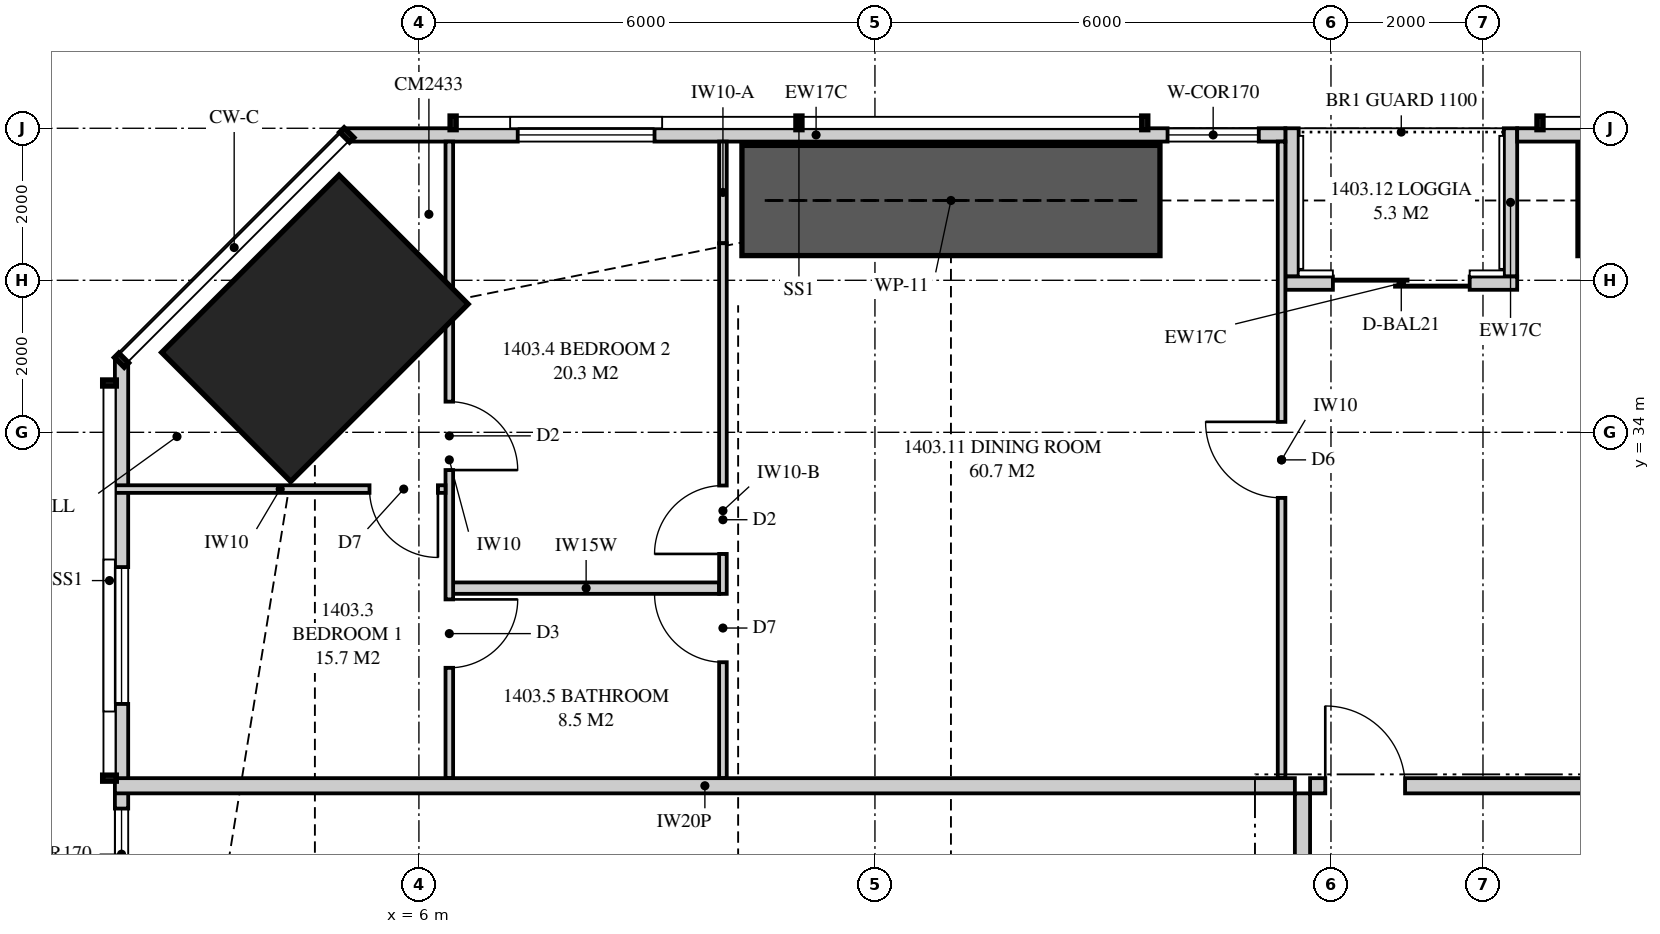
"""IFC4 building model, lengths in metres.
Left out: names, types, materials, properties, quantities, classifications, styles, units other than length and angle.
Written with IfcOpenShell. Run it as: python <this file> out.ifc"""

import sys

from ifc_helpers import new_model, si_unit, direction, frame, frame_2d, origin, origin_2d, place, context, subcontext, project, spatial, polyline, rectangle, outline, extrude, element, fill, save


model = new_model("IFC4")
c1 = context("Model", 3, precision=1e-05, world=origin(), true_north=direction((0.0, 1.0)))
c2 = subcontext(c1, "Body", "Model", "MODEL_VIEW")
j1 = project(units=[si_unit("LENGTHUNIT", "METRE"), si_unit("PLANEANGLEUNIT", "RADIAN")], contexts=[c1])
p1 = place(None, origin())
s1 = spatial("IfcSite", under=j1, at=p1, CompositionType="ELEMENT")
p2 = place(p1, origin())
s2 = spatial("IfcBuilding", under=s1, at=p2, CompositionType="ELEMENT")
p3 = place(p2, frame((0.0, 0.0, 54.5)))
s3 = spatial("IfcBuildingStorey", under=s2, at=p3, CompositionType="ELEMENT", Elevation=54.5)
p4 = place(p3, frame((4.631, 35.369, 0.0), z_axis=(0.0, 0.0, 1.0), x_axis=(0.707106781187, -0.707106781187, 0.0)))
e1 = element("IfcColumn", 1, at=p4, inside=s3, PredefinedType="COLUMN", context=c2, shape_type="SweptSolid", body=[
    extrude(rectangle(XDim=2.4, YDim=3.3, at=origin_2d()), origin(), (0.0, 0.0, 1.0), 3.35),
])
p5 = place(p3, frame((37.824, 37.913, 0.0), z_axis=(0.0, 0.0, 1.0), x_axis=(-1.0, 0.0, 0.0)))
e2 = element("IfcWall", 2, at=p5, inside=s3, PredefinedType="SOLIDWALL", context=c2, shape_type="SweptSolid", body=[
    extrude(outline(polyline([(0.0, 0.0), (17.374, 0.0), (17.374, 2.15), (2.824, 2.15), (2.824, 3.11), (2.668, 3.11), (2.668, 2.15), (2.62, 2.15), (2.62, 3.11), (0.0, 3.11), (0.0, 0.0)])), frame((0.0, 0.087, 0.0), z_axis=(0.0, -1.0, 0.0), x_axis=(1.0, 0.0, 0.0)), (0.0, 0.0, 1.0), 0.175),
])
p6 = place(p5, frame((5.699, 0.0, 0.4)))
e3 = element("IfcOpeningElement", 3, at=p6, cuts=e2, PredefinedType="OPENING", context=c2, shape_type="SweptSolid", body=[
    extrude(rectangle(XDim=1.8, YDim=1.7, at=frame_2d((0.9, 0.85))), frame((0.0, 0.097, 0.0), z_axis=(0.0, -1.0, 0.0), x_axis=(1.0, 0.0, 0.0)), (0.0, 0.0, 1.0), 0.195),
])
p7 = place(p5, frame((9.124, 0.0, 0.4)))
e4 = element("IfcOpeningElement", 4, at=p7, cuts=e2, PredefinedType="OPENING", context=c2, shape_type="SweptSolid", body=[
    extrude(rectangle(XDim=1.8, YDim=1.7, at=frame_2d((0.9, 0.85))), frame((0.0, 0.097, 0.0), z_axis=(0.0, -1.0, 0.0), x_axis=(1.0, 0.0, 0.0)), (0.0, 0.0, 1.0), 0.195),
])
p8 = place(p3, frame((17.4, 37.913, 0.0), z_axis=(0.0, 0.0, 1.0), x_axis=(-1.0, 0.0, 0.0)))
e5 = element("IfcWall", 5, at=p8, inside=s3, PredefinedType="SOLIDWALL", context=c2, shape_type="SweptSolid", body=[
    extrude(outline(polyline([(0.0, 0.0), (12.349, 0.0), (12.349, 3.11), (4.604, 3.11), (4.604, 2.15), (4.556, 2.15), (4.556, 3.11), (4.4, 3.11), (4.4, 2.15), (0.0, 2.15), (0.0, 0.0)])), frame((0.0, 0.087, 0.0), z_axis=(0.0, -1.0, 0.0), x_axis=(1.0, 0.0, 0.0)), (0.0, 0.0, 1.0), 0.175),
])
p9 = place(p8, frame((0.35, 0.0, 0.4)))
e6 = element("IfcOpeningElement", 6, at=p9, cuts=e5, PredefinedType="OPENING", context=c2, shape_type="SweptSolid", body=[
    extrude(rectangle(XDim=1.2, YDim=1.7, at=frame_2d((0.6, 0.85))), frame((0.0, 0.097, 0.0), z_axis=(0.0, -1.0, 0.0), x_axis=(1.0, 0.0, 0.0)), (0.0, 0.0, 1.0), 0.195),
])
p10 = place(p8, frame((8.3, 0.0, 0.4)))
e7 = element("IfcOpeningElement", 7, at=p10, cuts=e5, PredefinedType="OPENING", context=c2, shape_type="SweptSolid", body=[
    extrude(rectangle(XDim=1.8, YDim=1.7, at=frame_2d((0.9, 0.85))), frame((0.0, 0.097, 0.0), z_axis=(0.0, -1.0, 0.0), x_axis=(1.0, 0.0, 0.0)), (0.0, 0.0, 1.0), 0.195),
])
p11 = place(p3, frame((20.45, 35.962, 0.0), z_axis=(0.0, 0.0, 1.0), x_axis=(-1.0, 0.0, 0.0)))
e8 = element("IfcWall", 8, at=p11, inside=s3, PredefinedType="SOLIDWALL", context=c2, shape_type="SweptSolid", body=[
    extrude(rectangle(XDim=3.05, YDim=0.175, at=frame_2d((1.525, 0.0))), origin(), (0.0, 0.0, 1.0), 3.11),
])
p12 = place(p11, frame((0.625, 0.0, 0.0)))
e9 = element("IfcOpeningElement", 9, at=p12, cuts=e8, PredefinedType="OPENING", context=c2, shape_type="SweptSolid", body=[
    extrude(rectangle(XDim=1.8, YDim=2.1, at=frame_2d((0.9, 1.05))), frame((0.0, 0.097, 0.0), z_axis=(0.0, -1.0, 0.0), x_axis=(1.0, 0.0, 0.0)), (0.0, 0.0, 1.0), 0.195),
])
for number, where, z_axis, x_axis in (
    (10, (20.363, 38.0, 0.0), (0.0, 0.0, 1.0), (0.0, -1.0, 0.0)),
    (11, (17.488, 38.0, 0.0), (0.0, 0.0, 1.0), (0.0, -1.0, 0.0)),
):
    element("IfcWall", number, at=place(p3, frame(where, z_axis=z_axis, x_axis=x_axis)), inside=s3, PredefinedType="SOLIDWALL", context=c2, shape_type="SweptSolid", body=[
        extrude(outline(polyline([(0.0, 0.0), (1.95, 0.0), (1.95, 3.11), (1.75, 3.11), (1.75, 2.15), (0.15, 2.15), (0.15, 3.11), (0.0, 3.11), (0.0, 0.0)])), frame((0.0, 0.087, 0.0), z_axis=(0.0, -1.0, 0.0), x_axis=(1.0, 0.0, 0.0)), (0.0, 0.0, 1.0), 0.175),
    ])
p13 = place(p3, frame((2.087, 34.949, 0.0), z_axis=(0.0, 0.0, 1.0), x_axis=(0.0, -1.0, 0.0)))
e12 = element("IfcWall", 12, at=p13, inside=s3, PredefinedType="SOLIDWALL", context=c2, shape_type="SweptSolid", body=[
    extrude(outline(polyline([(0.0, 0.0), (15.599, 0.0), (15.599, 2.15), (9.949, 2.15), (9.949, 3.11), (9.823, 3.11), (9.823, 2.15), (9.73, 2.15), (9.73, 3.11), (0.0, 3.11), (0.0, 0.0)])), frame((0.0, 0.087, 0.0), z_axis=(0.0, -1.0, 0.0), x_axis=(1.0, 0.0, 0.0)), (0.0, 0.0, 1.0), 0.175),
])
p14 = place(p13, frame((2.722, 0.0, 0.4)))
e13 = element("IfcOpeningElement", 13, at=p14, cuts=e12, PredefinedType="OPENING", context=c2, shape_type="SweptSolid", body=[
    extrude(rectangle(XDim=1.8, YDim=1.7, at=frame_2d((0.9, 0.85))), frame((0.0, 0.097, 0.0), z_axis=(0.0, -1.0, 0.0), x_axis=(1.0, 0.0, 0.0)), (0.0, 0.0, 1.0), 0.195),
])
p15 = place(p13, frame((5.899, 0.0, 0.4)))
e14 = element("IfcOpeningElement", 14, at=p15, cuts=e12, PredefinedType="OPENING", context=c2, shape_type="SweptSolid", body=[
    extrude(rectangle(XDim=1.2, YDim=1.7, at=frame_2d((0.6, 0.85))), frame((0.0, 0.097, 0.0), z_axis=(0.0, -1.0, 0.0), x_axis=(1.0, 0.0, 0.0)), (0.0, 0.0, 1.0), 0.195),
])
p16 = place(p13, frame((12.824, 0.0, 0.4)))
e15 = element("IfcOpeningElement", 15, at=p16, cuts=e12, PredefinedType="OPENING", context=c2, shape_type="SweptSolid", body=[
    extrude(rectangle(XDim=1.8, YDim=1.7, at=frame_2d((0.9, 0.85))), frame((0.0, 0.097, 0.0), z_axis=(0.0, -1.0, 0.0), x_axis=(1.0, 0.0, 0.0)), (0.0, 0.0, 1.0), 0.195),
])
p17 = place(p3, frame((17.725, 29.35, 0.0), z_axis=(0.0, 0.0, 1.0), x_axis=(1.0, 0.0, 0.0)))
e16 = element("IfcWall", 16, at=p17, inside=s3, PredefinedType="PARTITIONING", context=c2, shape_type="SweptSolid", body=[
    extrude(outline(polyline([(0.0, 0.0), (15.275, 0.0), (15.275, 3.11), (6.612, 3.11), (6.612, 2.541), (5.938, 2.541), (5.938, 3.11), (0.0, 3.11), (0.0, 0.0)])), frame((0.0, 0.1, 0.0), z_axis=(0.0, -1.0, 0.0), x_axis=(1.0, 0.0, 0.0)), (0.0, 0.0, 1.0), 0.2),
])
p18 = place(p17, frame((0.2, 0.0, 0.0)))
e17 = element("IfcOpeningElement", 17, at=p18, cuts=e16, PredefinedType="OPENING", context=c2, shape_type="SweptSolid", body=[
    extrude(rectangle(XDim=1.05, YDim=2.2, at=frame_2d((0.525, 1.1))), frame((0.0, 0.11, 0.0), z_axis=(0.0, -1.0, 0.0), x_axis=(1.0, 0.0, 0.0)), (0.0, 0.0, 1.0), 0.22),
])
p19 = place(p3, frame((6.4, 37.825, 0.0), z_axis=(0.0, 0.0, 1.0), x_axis=(0.0, -1.0, 0.0)))
e18 = element("IfcWall", 18, at=p19, inside=s3, PredefinedType="PARTITIONING", context=c2, shape_type="SweptSolid", body=[
    extrude(outline(polyline([(0.0, 0.0), (8.375, 0.0), (8.375, 3.11), (2.978, 3.11), (2.978, 2.15), (1.224, 2.15), (1.224, 3.11), (0.0, 3.11), (0.0, 0.0)])), frame((0.0, 0.05, 0.0), z_axis=(0.0, -1.0, 0.0), x_axis=(1.0, 0.0, 0.0)), (0.0, 0.0, 1.0), 0.1),
])
p20 = place(p19, frame((3.422, 0.0, 0.0)))
e19 = element("IfcOpeningElement", 19, at=p20, cuts=e18, PredefinedType="OPENING", context=c2, shape_type="SweptSolid", body=[
    extrude(rectangle(XDim=0.9, YDim=2.1, at=frame_2d((0.45, 1.05))), frame((0.0, 0.06, 0.0), z_axis=(0.0, -1.0, 0.0), x_axis=(1.0, 0.0, 0.0)), (0.0, 0.0, 1.0), 0.12),
])
p21 = place(p19, frame((6.023, 0.0, 0.0)))
e20 = element("IfcOpeningElement", 20, at=p21, cuts=e18, PredefinedType="OPENING", context=c2, shape_type="SweptSolid", body=[
    extrude(rectangle(XDim=0.9, YDim=2.1, at=frame_2d((0.45, 1.05))), frame((0.0, 0.06, 0.0), z_axis=(0.0, -1.0, 0.0), x_axis=(1.0, 0.0, 0.0)), (0.0, 0.0, 1.0), 0.12),
])
p22 = place(p3, frame((10.0, 37.825, 0.0), z_axis=(0.0, 0.0, 1.0), x_axis=(0.0, -1.0, 0.0)))
e21 = element("IfcWall", 21, at=p22, inside=s3, PredefinedType="PARTITIONING", context=c2, shape_type="SweptSolid", body=[
    extrude(outline(polyline([(0.0, 0.0), (1.338, 0.0), (1.338, 2.15), (0.5, 2.15), (0.5, 3.11), (0.0, 3.11), (0.0, 0.0)])), frame((0.0, 0.05, 0.0), z_axis=(0.0, -1.0, 0.0), x_axis=(1.0, 0.0, 0.0)), (0.0, 0.0, 1.0), 0.1),
])
p23 = place(p3, frame((10.0, 36.487, 0.0), z_axis=(0.0, 0.0, 1.0), x_axis=(0.0, -1.0, 0.0)))
e22 = element("IfcWall", 22, at=p23, inside=s3, PredefinedType="PARTITIONING", context=c2, shape_type="SweptSolid", body=[
    extrude(outline(polyline([(0.0, 0.0), (7.037, 0.0), (7.037, 2.51), (0.917, 2.51), (0.917, 2.15), (0.0, 2.15), (0.0, 0.0)])), frame((0.0, 0.05, 0.0), z_axis=(0.0, -1.0, 0.0), x_axis=(1.0, 0.0, 0.0)), (0.0, 0.0, 1.0), 0.1),
])
p24 = place(p23, frame((3.188, 0.0, 0.0)))
e23 = element("IfcOpeningElement", 23, at=p24, cuts=e22, PredefinedType="OPENING", context=c2, shape_type="SweptSolid", body=[
    extrude(rectangle(XDim=0.9, YDim=2.1, at=frame_2d((0.45, 1.05))), frame((0.0, 0.06, 0.0), z_axis=(0.0, -1.0, 0.0), x_axis=(1.0, 0.0, 0.0)), (0.0, 0.0, 1.0), 0.12),
])
p25 = place(p23, frame((4.612, 0.0, 0.0)))
e24 = element("IfcOpeningElement", 24, at=p25, cuts=e22, PredefinedType="OPENING", context=c2, shape_type="SweptSolid", body=[
    extrude(rectangle(XDim=0.9, YDim=2.1, at=frame_2d((0.45, 1.05))), frame((0.0, 0.06, 0.0), z_axis=(0.0, -1.0, 0.0), x_axis=(1.0, 0.0, 0.0)), (0.0, 0.0, 1.0), 0.12),
])
p26 = place(p3, frame((2.0, 33.253, 0.0), z_axis=(0.0, 0.0, 1.0), x_axis=(1.0, 0.0, 0.0)))
e25 = element("IfcWall", 25, at=p26, inside=s3, PredefinedType="PARTITIONING", context=c2, shape_type="SweptSolid", body=[
    extrude(outline(polyline([(0.0, 0.0), (4.35, 0.0), (4.35, 3.11), (3.16, 3.11), (3.16, 2.15), (1.417, 2.15), (1.417, 3.11), (0.0, 3.11), (0.0, 0.0)])), frame((0.0, 0.05, 0.0), z_axis=(0.0, -1.0, 0.0), x_axis=(1.0, 0.0, 0.0)), (0.0, 0.0, 1.0), 0.1),
])
p27 = place(p26, frame((3.35, 0.0, 0.0)))
e26 = element("IfcOpeningElement", 26, at=p27, cuts=e25, PredefinedType="OPENING", context=c2, shape_type="SweptSolid", body=[
    extrude(rectangle(XDim=0.9, YDim=2.1, at=frame_2d((0.45, 1.05))), frame((0.0, 0.06, 0.0), z_axis=(0.0, -1.0, 0.0), x_axis=(1.0, 0.0, 0.0)), (0.0, 0.0, 1.0), 0.12),
])
p28 = place(p3, frame((6.45, 31.95, 0.0), z_axis=(0.0, 0.0, 1.0), x_axis=(1.0, 0.0, 0.0)))
e27 = element("IfcWall", 27, at=p28, inside=s3, PredefinedType="PLUMBINGWALL", context=c2, shape_type="SweptSolid", body=[
    extrude(outline(polyline([(0.0, 0.0), (3.5, 0.0), (3.5, 3.11), (3.5, 2.51), (2.465, 2.51), (2.465, 3.11), (0.0, 3.11), (0.0, 0.0)])), frame((0.0, 0.075, 0.0), z_axis=(0.0, -1.0, 0.0), x_axis=(1.0, 0.0, 0.0)), (0.0, 0.0, 1.0), 0.15),
])
p29 = place(p3, frame((17.35, 37.825, 0.0), z_axis=(0.0, 0.0, 1.0), x_axis=(0.0, -1.0, 0.0)))
e28 = element("IfcWall", 28, at=p29, inside=s3, PredefinedType="PARTITIONING", context=c2, shape_type="SweptSolid", body=[
    extrude(outline(polyline([(0.0, 0.0), (8.375, 0.0), (8.375, 3.11), (1.635, 3.11), (1.635, 2.15), (0.0, 2.15), (0.0, 3.11), (0.0, 0.0)])), frame((0.0, 0.05, 0.0), z_axis=(0.0, -1.0, 0.0), x_axis=(1.0, 0.0, 0.0)), (0.0, 0.0, 1.0), 0.1),
])
p30 = place(p29, frame((3.688, 0.0, 0.0)))
e29 = element("IfcOpeningElement", 29, at=p30, cuts=e28, PredefinedType="OPENING", context=c2, shape_type="SweptSolid", body=[
    extrude(rectangle(XDim=1.0, YDim=2.1, at=frame_2d((0.5, 1.05))), frame((0.0, 0.06, 0.0), z_axis=(0.0, -1.0, 0.0), x_axis=(1.0, 0.0, 0.0)), (0.0, 0.0, 1.0), 0.12),
])
p31 = place(p3, frame((2.0, 29.35, 0.0), z_axis=(0.0, 0.0, 1.0), x_axis=(1.0, 0.0, 0.0)))
e30 = element("IfcWall", 30, at=p31, inside=s3, PredefinedType="PARTITIONING", context=c2, shape_type="SweptSolid", body=[
    extrude(outline(polyline([(0.0, 0.0), (15.525, 0.0), (15.525, 3.11), (11.337, 3.11), (11.337, 2.541), (10.663, 2.541), (10.663, 3.11), (9.51, 3.11), (9.51, 2.51), (6.89, 2.51), (6.89, 3.11), (2.969, 3.11), (2.969, 2.541), (2.577, 2.541), (2.577, 2.15), (0.733, 2.15), (0.733, 3.11), (0.0, 3.11), (0.0, 0.0)])), frame((0.0, 0.1, 0.0), z_axis=(0.0, -1.0, 0.0), x_axis=(1.0, 0.0, 0.0)), (0.0, 0.0, 1.0), 0.2),
])
p32 = place(p3, frame((17.625, 24.2, 0.0), z_axis=(0.0, 0.0, 1.0), x_axis=(0.0, 1.0, 0.0)))
e31 = element("IfcWall", 31, at=p32, inside=s3, PredefinedType="PARTITIONING", context=c2, shape_type="SweptSolid", body=[
    extrude(outline(polyline([(0.0, 0.0), (5.05, 0.0), (5.05, 3.11), (1.137, 3.11), (1.137, 2.541), (0.463, 2.541), (0.463, 3.11), (0.0, 3.11), (0.0, 0.0)])), frame((0.0, 0.1, 0.0), z_axis=(0.0, -1.0, 0.0), x_axis=(1.0, 0.0, 0.0)), (0.0, 0.0, 1.0), 0.2),
])
p33 = place(p32, frame((1.075, 0.0, 0.0)))
e32 = element("IfcOpeningElement", 32, at=p33, cuts=e31, PredefinedType="OPENING", context=c2, shape_type="SweptSolid", body=[
    extrude(rectangle(XDim=1.8, YDim=2.1, at=frame_2d((0.9, 1.05))), frame((0.0, 0.11, 0.0), z_axis=(0.0, -1.0, 0.0), x_axis=(1.0, 0.0, 0.0)), (0.0, 0.0, 1.0), 0.22),
])
for number, where, z_axis, x_axis in (
    (33, (21.25, 37.05, 0.0), (0.0, 0.0, 1.0), (1.0, 0.0, 0.0)),
    (34, (10.25, 37.05, 0.0), (0.0, 0.0, 1.0), (1.0, 0.0, 0.0)),
):
    element("IfcWall", number, at=place(p3, frame(where, z_axis=z_axis, x_axis=x_axis)), inside=s3, PredefinedType="SHEAR", context=c2, shape_type="SweptSolid", body=[
        extrude(rectangle(XDim=5.5, YDim=1.45, at=frame_2d((2.75, 0.0))), origin(), (0.0, 0.0, 1.0), 3.35),
    ])
p34 = place(p12, origin())
e35 = element("IfcDoor", 35, at=p34, inside=s3, OperationType="SLIDING_TO_LEFT", PredefinedType="DOOR", context=c2, shape_type="SweptSolid", body=[
    extrude(rectangle(XDim=1.8, YDim=2.1, at=frame_2d((0.9, 1.05))), frame((0.0, 0.025, 0.0), z_axis=(0.0, -1.0, 0.0), x_axis=(1.0, 0.0, 0.0)), (0.0, 0.0, 1.0), 0.05),
])
fill(e9, e35)
p35 = place(p9, origin())
e36 = element("IfcWindow", 36, at=p35, inside=s3, PartitioningType="SINGLE_PANEL", PredefinedType="WINDOW", context=c2, shape_type="SweptSolid", body=[
    extrude(rectangle(XDim=1.2, YDim=1.7, at=frame_2d((0.6, 0.85))), frame((0.0, 0.03, 0.0), z_axis=(0.0, -1.0, 0.0), x_axis=(1.0, 0.0, 0.0)), (0.0, 0.0, 1.0), 0.06),
])
fill(e6, e36)
p36 = place(p10, origin())
e37 = element("IfcWindow", 37, at=p36, inside=s3, PartitioningType="SINGLE_PANEL", PredefinedType="WINDOW", context=c2, shape_type="SweptSolid", body=[
    extrude(rectangle(XDim=1.8, YDim=1.7, at=frame_2d((0.9, 0.85))), frame((0.0, 0.03, 0.0), z_axis=(0.0, -1.0, 0.0), x_axis=(1.0, 0.0, 0.0)), (0.0, 0.0, 1.0), 0.06),
])
fill(e7, e37)
p37 = place(p14, origin())
e38 = element("IfcWindow", 38, at=p37, inside=s3, PartitioningType="SINGLE_PANEL", PredefinedType="WINDOW", context=c2, shape_type="SweptSolid", body=[
    extrude(rectangle(XDim=1.8, YDim=1.7, at=frame_2d((0.9, 0.85))), frame((0.0, 0.03, 0.0), z_axis=(0.0, -1.0, 0.0), x_axis=(1.0, 0.0, 0.0)), (0.0, 0.0, 1.0), 0.06),
])
fill(e13, e38)
p38 = place(p15, origin())
e39 = element("IfcWindow", 39, at=p38, inside=s3, PartitioningType="SINGLE_PANEL", PredefinedType="WINDOW", context=c2, shape_type="SweptSolid", body=[
    extrude(rectangle(XDim=1.2, YDim=1.7, at=frame_2d((0.6, 0.85))), frame((0.0, 0.03, 0.0), z_axis=(0.0, -1.0, 0.0), x_axis=(1.0, 0.0, 0.0)), (0.0, 0.0, 1.0), 0.06),
])
fill(e14, e39)
p39 = place(p18, origin())
e40 = element("IfcDoor", 40, at=p39, inside=s3, OperationType="SINGLE_SWING_LEFT", PredefinedType="DOOR", context=c2, shape_type="SweptSolid", body=[
    extrude(rectangle(XDim=1.05, YDim=2.2, at=frame_2d((0.525, 1.1))), frame((0.0, 0.025, 0.0), z_axis=(0.0, -1.0, 0.0), x_axis=(1.0, 0.0, 0.0)), (0.0, 0.0, 1.0), 0.05),
])
fill(e17, e40)
p40 = place(p27, frame((0.9, 0.0, 0.0), z_axis=(0.0, 0.0, 1.0), x_axis=(-1.0, 0.0, 0.0)))
e41 = element("IfcDoor", 41, at=p40, inside=s3, OperationType="SINGLE_SWING_LEFT", PredefinedType="DOOR", context=c2, shape_type="SweptSolid", body=[
    extrude(rectangle(XDim=0.9, YDim=2.1, at=frame_2d((0.45, 1.05))), frame((0.0, 0.025, 0.0), z_axis=(0.0, -1.0, 0.0), x_axis=(1.0, 0.0, 0.0)), (0.0, 0.0, 1.0), 0.05),
])
fill(e26, e41)
p41 = place(p20, origin())
e42 = element("IfcDoor", 42, at=p41, inside=s3, OperationType="SINGLE_SWING_RIGHT", PredefinedType="DOOR", context=c2, shape_type="SweptSolid", body=[
    extrude(rectangle(XDim=0.9, YDim=2.1, at=frame_2d((0.45, 1.05))), frame((0.0, 0.025, 0.0), z_axis=(0.0, -1.0, 0.0), x_axis=(1.0, 0.0, 0.0)), (0.0, 0.0, 1.0), 0.05),
])
fill(e19, e42)
p42 = place(p24, frame((0.9, 0.0, 0.0), z_axis=(0.0, 0.0, 1.0), x_axis=(-1.0, 0.0, 0.0)))
e43 = element("IfcDoor", 43, at=p42, inside=s3, OperationType="SINGLE_SWING_LEFT", PredefinedType="DOOR", context=c2, shape_type="SweptSolid", body=[
    extrude(rectangle(XDim=0.9, YDim=2.1, at=frame_2d((0.45, 1.05))), frame((0.0, 0.025, 0.0), z_axis=(0.0, -1.0, 0.0), x_axis=(1.0, 0.0, 0.0)), (0.0, 0.0, 1.0), 0.05),
])
fill(e23, e43)
p43 = place(p25, frame((0.9, 0.0, 0.0), z_axis=(0.0, 0.0, 1.0), x_axis=(-1.0, 0.0, 0.0)))
e44 = element("IfcDoor", 44, at=p43, inside=s3, OperationType="SINGLE_SWING_RIGHT", PredefinedType="DOOR", context=c2, shape_type="SweptSolid", body=[
    extrude(rectangle(XDim=0.9, YDim=2.1, at=frame_2d((0.45, 1.05))), frame((0.0, 0.025, 0.0), z_axis=(0.0, -1.0, 0.0), x_axis=(1.0, 0.0, 0.0)), (0.0, 0.0, 1.0), 0.05),
])
fill(e24, e44)
p44 = place(p21, origin())
e45 = element("IfcDoor", 45, at=p44, inside=s3, OperationType="SINGLE_SWING_LEFT", PredefinedType="DOOR", context=c2, shape_type="SweptSolid", body=[
    extrude(rectangle(XDim=0.9, YDim=2.1, at=frame_2d((0.45, 1.05))), frame((0.0, 0.025, 0.0), z_axis=(0.0, -1.0, 0.0), x_axis=(1.0, 0.0, 0.0)), (0.0, 0.0, 1.0), 0.05),
])
fill(e20, e45)
p45 = place(p30, frame((1.0, 0.0, 0.0), z_axis=(0.0, 0.0, 1.0), x_axis=(-1.0, 0.0, 0.0)))
e46 = element("IfcDoor", 46, at=p45, inside=s3, OperationType="SINGLE_SWING_RIGHT", PredefinedType="DOOR", context=c2, shape_type="SweptSolid", body=[
    extrude(rectangle(XDim=1.0, YDim=2.1, at=frame_2d((0.5, 1.05))), frame((0.0, 0.025, 0.0), z_axis=(0.0, -1.0, 0.0), x_axis=(1.0, 0.0, 0.0)), (0.0, 0.0, 1.0), 0.05),
])
fill(e29, e46)
save(model, sys.argv[1])
